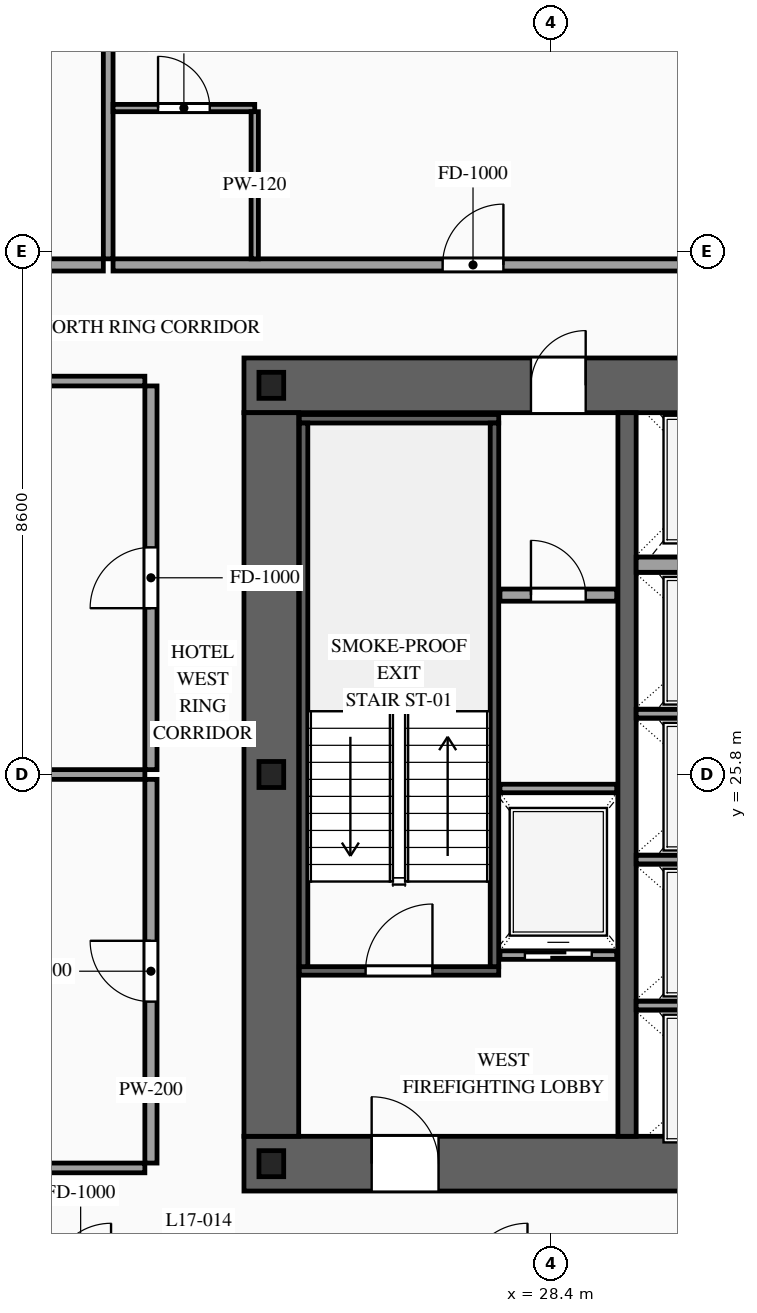
"""IFC4 building model, lengths in metres.
Left out: names, types, materials, properties, quantities, classifications, styles, units other than length and angle.
Written with IfcOpenShell. Run it as: python <this file> out.ifc"""

import sys

from ifc_helpers import new_model, si_unit, direction, frame, frame_2d, origin, origin_2d, place, context, subcontext, project, spatial, rectangle, i_section, extrude, source, transform, mapped, element, fill, save


model = new_model("IFC4")
c1 = context("Model", 3, precision=1e-05, world=origin(), true_north=direction((0.0, 1.0)))
c2 = subcontext(c1, "Body", "Model", "MODEL_VIEW")
j1 = project(units=[si_unit("LENGTHUNIT", "METRE"), si_unit("PLANEANGLEUNIT", "RADIAN")], contexts=[c1])
p1 = place(None, origin())
s1 = spatial("IfcSite", under=j1, at=p1, CompositionType="ELEMENT")
p2 = place(p1, origin())
s2 = spatial("IfcBuilding", under=s1, at=p2, CompositionType="ELEMENT")
p3 = place(p2, frame((0.0, 0.0, 67.6)))
s3 = spatial("IfcBuildingStorey", under=s2, at=p3, CompositionType="ELEMENT", Elevation=67.6)
p4 = place(p3, frame((23.35, 19.4, 0.0), z_axis=(0.0, 0.0, 1.0), x_axis=(1.0, 0.0, 0.0)))
e1 = element("IfcWall", 1, at=p4, inside=s3, PredefinedType="SHEAR", context=c2, shape_type="SweptSolid", body=[
    extrude(rectangle(XDim=27.3, YDim=0.9, at=frame_2d((13.65, 0.0))), origin(), (0.0, 0.0, 1.0), 3.6),
])
p5 = place(p4, frame((2.1, 0.0, 0.0)))
e2 = element("IfcOpeningElement", 2, at=p5, cuts=e1, PredefinedType="OPENING", context=c2, shape_type="SweptSolid", body=[
    extrude(rectangle(XDim=1.1, YDim=2.2, at=frame_2d((0.55, 1.1))), frame((0.0, 0.465, 0.0), z_axis=(0.0, -1.0, 0.0), x_axis=(1.0, 0.0, 0.0)), (0.0, 0.0, 1.0), 0.93),
])
p6 = place(p4, frame((10.0, 0.0, 0.0)))
e3 = element("IfcOpeningElement", 3, at=p6, cuts=e1, PredefinedType="OPENING", context=c2, shape_type="SweptSolid", body=[
    extrude(rectangle(XDim=1.1, YDim=2.2, at=frame_2d((0.55, 1.1))), frame((0.0, 0.465, 0.0), z_axis=(0.0, -1.0, 0.0), x_axis=(1.0, 0.0, 0.0)), (0.0, 0.0, 1.0), 0.93),
])
p7 = place(p4, frame((23.2, 0.0, 0.0)))
e4 = element("IfcOpeningElement", 4, at=p7, cuts=e1, PredefinedType="OPENING", context=c2, shape_type="SweptSolid", body=[
    extrude(rectangle(XDim=1.1, YDim=2.2, at=frame_2d((0.55, 1.1))), frame((0.0, 0.465, 0.0), z_axis=(0.0, -1.0, 0.0), x_axis=(1.0, 0.0, 0.0)), (0.0, 0.0, 1.0), 0.93),
])
p8 = place(p4, frame((19.82, 0.0, 0.0)))
e5 = element("IfcOpeningElement", 5, at=p8, cuts=e1, PredefinedType="OPENING", context=c2, shape_type="SweptSolid", body=[
    extrude(rectangle(XDim=0.9, YDim=2.15, at=frame_2d((0.45, 1.075))), frame((0.0, 0.465, 0.0), z_axis=(0.0, -1.0, 0.0), x_axis=(1.0, 0.0, 0.0)), (0.0, 0.0, 1.0), 0.93),
])
p9 = place(p4, frame((18.38, 0.0, 0.0)))
e6 = element("IfcOpeningElement", 6, at=p9, cuts=e1, PredefinedType="OPENING", context=c2, shape_type="SweptSolid", body=[
    extrude(rectangle(XDim=0.9, YDim=2.15, at=frame_2d((0.45, 1.075))), frame((0.0, 0.465, 0.0), z_axis=(0.0, -1.0, 0.0), x_axis=(1.0, 0.0, 0.0)), (0.0, 0.0, 1.0), 0.93),
])
p10 = place(p3, frame((23.35, 32.2, 0.0), z_axis=(0.0, 0.0, 1.0), x_axis=(1.0, 0.0, 0.0)))
e7 = element("IfcWall", 7, at=p10, inside=s3, PredefinedType="SHEAR", context=c2, shape_type="SweptSolid", body=[
    extrude(rectangle(XDim=27.3, YDim=0.9, at=frame_2d((13.65, 0.0))), origin(), (0.0, 0.0, 1.0), 3.6),
])
p11 = place(p10, frame((4.72, 0.0, 0.0)))
e8 = element("IfcOpeningElement", 8, at=p11, cuts=e7, PredefinedType="OPENING", context=c2, shape_type="SweptSolid", body=[
    extrude(rectangle(XDim=0.9, YDim=2.15, at=frame_2d((0.45, 1.075))), frame((0.0, 0.465, 0.0), z_axis=(0.0, -1.0, 0.0), x_axis=(1.0, 0.0, 0.0)), (0.0, 0.0, 1.0), 0.93),
])
p12 = place(p10, frame((10.0, 0.0, 0.0)))
e9 = element("IfcOpeningElement", 9, at=p12, cuts=e7, PredefinedType="OPENING", context=c2, shape_type="SweptSolid", body=[
    extrude(rectangle(XDim=1.1, YDim=2.2, at=frame_2d((0.55, 1.1))), frame((0.0, 0.465, 0.0), z_axis=(0.0, -1.0, 0.0), x_axis=(1.0, 0.0, 0.0)), (0.0, 0.0, 1.0), 0.93),
])
p13 = place(p10, frame((15.85, 0.0, 0.0)))
e10 = element("IfcOpeningElement", 10, at=p13, cuts=e7, PredefinedType="OPENING", context=c2, shape_type="SweptSolid", body=[
    extrude(rectangle(XDim=1.1, YDim=2.2, at=frame_2d((0.55, 1.1))), frame((0.0, 0.465, 0.0), z_axis=(0.0, -1.0, 0.0), x_axis=(1.0, 0.0, 0.0)), (0.0, 0.0, 1.0), 0.93),
])
p14 = place(p10, frame((18.38, 0.0, 0.0)))
e11 = element("IfcOpeningElement", 11, at=p14, cuts=e7, PredefinedType="OPENING", context=c2, shape_type="SweptSolid", body=[
    extrude(rectangle(XDim=0.9, YDim=2.15, at=frame_2d((0.45, 1.075))), frame((0.0, 0.465, 0.0), z_axis=(0.0, -1.0, 0.0), x_axis=(1.0, 0.0, 0.0)), (0.0, 0.0, 1.0), 0.93),
])
p15 = place(p10, frame((19.82, 0.0, 0.0)))
e12 = element("IfcOpeningElement", 12, at=p15, cuts=e7, PredefinedType="OPENING", context=c2, shape_type="SweptSolid", body=[
    extrude(rectangle(XDim=0.9, YDim=2.15, at=frame_2d((0.45, 1.075))), frame((0.0, 0.465, 0.0), z_axis=(0.0, -1.0, 0.0), x_axis=(1.0, 0.0, 0.0)), (0.0, 0.0, 1.0), 0.93),
])
m1 = source(origin(), c2, "Body", "SweptSolid", [
    extrude(rectangle(XDim=11.9, YDim=0.9, at=frame_2d((5.95, 0.0))), origin(), (0.0, 0.0, 1.0), 3.6),
])
p16 = place(p3, frame((23.8, 19.85, 0.0), z_axis=(0.0, 0.0, 1.0), x_axis=(0.0, 1.0, 0.0)))
e13 = element("IfcWall", 13, at=p16, inside=s3, PredefinedType="SHEAR", context=c2, shape_type="MappedRepresentation", body=[
    mapped(m1, transform((0.0, 0.0, 0.0), scale=1.0)),
])
m2 = source(origin(), c2, "Body", "SweptSolid", [
    extrude(rectangle(XDim=11.9, YDim=0.3, at=frame_2d((5.95, 0.0))), origin(), (0.0, 0.0, 1.0), 3.6),
])
p17 = place(p3, frame((29.65, 19.85, 0.0), z_axis=(0.0, 0.0, 1.0), x_axis=(0.0, 1.0, 0.0)))
e14 = element("IfcWall", 14, at=p17, inside=s3, PredefinedType="SOLIDWALL", context=c2, shape_type="MappedRepresentation", body=[
    mapped(m2, transform((0.0, 0.0, 0.0), scale=1.0)),
])
m3 = source(origin(), c2, "Body", "SweptSolid", [
    extrude(i_section(OverallWidth=0.407, OverallDepth=0.428, WebThickness=0.02, FlangeThickness=0.035, at=origin_2d()), origin(), (0.0, 0.0, 1.0), 3.6),
])
for number, where, z_axis, x_axis in (
    (15, (23.8, 19.4, 0.0), (0.0, 0.0, 1.0), (1.0, 0.0, 0.0)),
    (16, (23.8, 25.8, 0.0), (0.0, 0.0, 1.0), (1.0, 0.0, 0.0)),
    (17, (23.8, 32.2, 0.0), (0.0, 0.0, 1.0), (1.0, 0.0, 0.0)),
):
    element("IfcColumn", number, at=place(p3, frame(where, z_axis=z_axis, x_axis=x_axis)), inside=s3, PredefinedType="COLUMN", context=c2, shape_type="MappedRepresentation", body=[
        mapped(m3, transform((0.0, 0.0, 0.0), scale=1.0)),
    ])
p18 = place(p3, frame((27.56, 22.83, 0.0), z_axis=(0.0, 0.0, 1.0), x_axis=(1.0, 0.0, 0.0)))
e18 = element("IfcWall", 18, at=p18, inside=s3, PredefinedType="SOLIDWALL", context=c2, shape_type="SweptSolid", body=[
    extrude(rectangle(XDim=1.92, YDim=0.14, at=frame_2d((0.96, 0.0))), origin(), (0.0, 0.0, 1.0), 3.38),
])
p19 = place(p18, frame((0.41, 0.0, 0.0)))
e19 = element("IfcOpeningElement", 19, at=p19, cuts=e18, PredefinedType="OPENING", context=c2, shape_type="SweptSolid", body=[
    extrude(rectangle(XDim=1.1, YDim=2.2, at=frame_2d((0.55, 1.1))), frame((0.0, 0.085, 0.0), z_axis=(0.0, -1.0, 0.0), x_axis=(1.0, 0.0, 0.0)), (0.0, 0.0, 1.0), 0.17),
])
m4 = source(origin(), c2, "Body", "SweptSolid", [
    extrude(rectangle(XDim=1.92, YDim=0.14, at=frame_2d((0.96, 0.0))), origin(), (0.0, 0.0, 1.0), 3.38),
])
p20 = place(p3, frame((27.56, 25.57, 0.0), z_axis=(0.0, 0.0, 1.0), x_axis=(1.0, 0.0, 0.0)))
e20 = element("IfcWall", 20, at=p20, inside=s3, PredefinedType="SOLIDWALL", context=c2, shape_type="MappedRepresentation", body=[
    mapped(m4, transform((0.0, 0.0, 0.0), scale=1.0)),
])
m5 = source(origin(), c2, "Body", "SweptSolid", [
    extrude(rectangle(XDim=2.5, YDim=0.14, at=frame_2d((1.25, 0.0))), origin(), (0.0, 0.0, 1.0), 3.38),
])
for number, where, z_axis, x_axis in (
    (21, (29.8, 22.0, 0.0), (0.0, 0.0, 1.0), (1.0, 0.0, 0.0)),
    (22, (29.8, 24.4, 0.0), (0.0, 0.0, 1.0), (1.0, 0.0, 0.0)),
    (23, (29.8, 26.8, 0.0), (0.0, 0.0, 1.0), (1.0, 0.0, 0.0)),
):
    element("IfcWall", number, at=place(p3, frame(where, z_axis=z_axis, x_axis=x_axis)), inside=s3, PredefinedType="SOLIDWALL", context=c2, shape_type="MappedRepresentation", body=[
        mapped(m5, transform((0.0, 0.0, 0.0), scale=1.0)),
    ])
m6 = source(origin(), c2, "Body", "SweptSolid", [
    extrude(rectangle(XDim=2.5, YDim=0.25, at=frame_2d((1.25, 0.0))), origin(), (0.0, 0.0, 1.0), 3.38),
])
p21 = place(p3, frame((29.8, 29.25, 0.0), z_axis=(0.0, 0.0, 1.0), x_axis=(1.0, 0.0, 0.0)))
e24 = element("IfcWall", 24, at=p21, inside=s3, PredefinedType="SOLIDWALL", context=c2, shape_type="MappedRepresentation", body=[
    mapped(m6, transform((0.0, 0.0, 0.0), scale=1.0)),
])
p22 = place(p3, frame((24.26, 22.57, 0.0), z_axis=(0.0, 0.0, 1.0), x_axis=(1.0, 0.0, 0.0)))
e25 = element("IfcWall", 25, at=p22, inside=s3, PredefinedType="SOLIDWALL", context=c2, shape_type="SweptSolid", body=[
    extrude(rectangle(XDim=3.28, YDim=0.14, at=frame_2d((1.64, 0.0))), origin(), (0.0, 0.0, 1.0), 3.38),
])
p23 = place(p22, frame((1.09, 0.0, 0.0)))
e26 = element("IfcOpeningElement", 26, at=p23, cuts=e25, PredefinedType="OPENING", context=c2, shape_type="SweptSolid", body=[
    extrude(rectangle(XDim=1.1, YDim=2.2, at=frame_2d((0.55, 1.1))), frame((0.0, 0.085, 0.0), z_axis=(0.0, -1.0, 0.0), x_axis=(1.0, 0.0, 0.0)), (0.0, 0.0, 1.0), 0.17),
])
m7 = source(origin(), c2, "Body", "SweptSolid", [
    extrude(rectangle(XDim=3.28, YDim=0.14, at=frame_2d((1.64, 0.0))), origin(), (0.0, 0.0, 1.0), 3.38),
])
p24 = place(p3, frame((24.26, 31.65, 0.0), z_axis=(0.0, 0.0, 1.0), x_axis=(1.0, 0.0, 0.0)))
e27 = element("IfcWall", 27, at=p24, inside=s3, PredefinedType="SOLIDWALL", context=c2, shape_type="MappedRepresentation", body=[
    mapped(m7, transform((0.0, 0.0, 0.0), scale=1.0)),
])
m8 = source(origin(), c2, "Body", "SweptSolid", [
    extrude(rectangle(XDim=8.94, YDim=0.14, at=frame_2d((4.47, 0.0))), origin(), (0.0, 0.0, 1.0), 3.38),
])
for number, where, z_axis, x_axis in (
    (28, (24.33, 22.64, 0.0), (0.0, 0.0, 1.0), (0.0, 1.0, 0.0)),
    (29, (27.47, 22.64, 0.0), (0.0, 0.0, 1.0), (0.0, 1.0, 0.0)),
):
    element("IfcWall", number, at=place(p3, frame(where, z_axis=z_axis, x_axis=x_axis)), inside=s3, PredefinedType="SOLIDWALL", context=c2, shape_type="MappedRepresentation", body=[
        mapped(m8, transform((0.0, 0.0, 0.0), scale=1.0)),
    ])
p25 = place(p3, frame((27.56, 28.75, 0.0), z_axis=(0.0, 0.0, 1.0), x_axis=(1.0, 0.0, 0.0)))
e30 = element("IfcWall", 30, at=p25, inside=s3, PredefinedType="PARTITIONING", context=c2, shape_type="SweptSolid", body=[
    extrude(rectangle(XDim=1.92, YDim=0.2, at=frame_2d((0.96, 0.0))), origin(), (0.0, 0.0, 1.0), 3.38),
])
p26 = place(p25, frame((0.51, 0.0, 0.0)))
e31 = element("IfcOpeningElement", 31, at=p26, cuts=e30, PredefinedType="OPENING", context=c2, shape_type="SweptSolid", body=[
    extrude(rectangle(XDim=0.9, YDim=2.15, at=frame_2d((0.45, 1.075))), frame((0.0, 0.115, 0.0), z_axis=(0.0, -1.0, 0.0), x_axis=(1.0, 0.0, 0.0)), (0.0, 0.0, 1.0), 0.23),
])
p27 = place(p3, frame((14.94, 34.18, 0.0), z_axis=(0.0, 0.0, 1.0), x_axis=(1.0, 0.0, 0.0)))
e32 = element("IfcWall", 32, at=p27, inside=s3, PredefinedType="PARTITIONING", context=c2, shape_type="SweptSolid", body=[
    extrude(rectangle(XDim=6.097, YDim=0.2, at=frame_2d((3.049, 0.0))), origin(), (0.0, 0.0, 1.0), 3.38),
])
p28 = place(p27, frame((3.754, 0.0, 0.0)))
e33 = element("IfcOpeningElement", 33, at=p28, cuts=e32, PredefinedType="OPENING", context=c2, shape_type="SweptSolid", body=[
    extrude(rectangle(XDim=1.0, YDim=2.2, at=frame_2d((0.5, 1.1))), frame((0.0, 0.115, 0.0), z_axis=(0.0, -1.0, 0.0), x_axis=(1.0, 0.0, 0.0)), (0.0, 0.0, 1.0), 0.23),
])
m9 = source(origin(), c2, "Body", "SweptSolid", [
    extrude(rectangle(XDim=16.47, YDim=0.16, at=frame_2d((8.235, 0.0))), origin(), (0.0, 0.0, 1.0), 3.38),
])
p29 = place(p3, frame((21.117, 34.28, 0.0), z_axis=(0.0, 0.0, 1.0), x_axis=(0.0, 1.0, 0.0)))
e34 = element("IfcWall", 34, at=p29, inside=s3, PredefinedType="PARTITIONING", context=c2, shape_type="MappedRepresentation", body=[
    mapped(m9, transform((0.0, 0.0, 0.0), scale=1.0)),
])
p30 = place(p3, frame((21.197, 34.18, 0.0), z_axis=(0.0, 0.0, 1.0), x_axis=(1.0, 0.0, 0.0)))
e35 = element("IfcWall", 35, at=p30, inside=s3, PredefinedType="PARTITIONING", context=c2, shape_type="SweptSolid", body=[
    extrude(rectangle(XDim=9.429, YDim=0.2, at=frame_2d((4.714, 0.0))), origin(), (0.0, 0.0, 1.0), 3.38),
])
p31 = place(p30, frame((5.42, 0.0, 0.0)))
e36 = element("IfcOpeningElement", 36, at=p31, cuts=e35, PredefinedType="OPENING", context=c2, shape_type="SweptSolid", body=[
    extrude(rectangle(XDim=1.0, YDim=2.2, at=frame_2d((0.5, 1.1))), frame((0.0, 0.115, 0.0), z_axis=(0.0, -1.0, 0.0), x_axis=(1.0, 0.0, 0.0)), (0.0, 0.0, 1.0), 0.23),
])
p32 = place(p3, frame((21.197, 36.76, 0.0), z_axis=(0.0, 0.0, 1.0), x_axis=(1.0, 0.0, 0.0)))
e37 = element("IfcWall", 37, at=p32, inside=s3, PredefinedType="PARTITIONING", context=c2, shape_type="SweptSolid", body=[
    extrude(rectangle(XDim=2.33, YDim=0.12, at=frame_2d((1.165, 0.0))), origin(), (0.0, 0.0, 1.0), 3.38),
])
p33 = place(p32, frame((0.74, 0.0, 0.0)))
e38 = element("IfcOpeningElement", 38, at=p33, cuts=e37, PredefinedType="OPENING", context=c2, shape_type="SweptSolid", body=[
    extrude(rectangle(XDim=0.85, YDim=2.1, at=frame_2d((0.425, 1.05))), frame((0.0, 0.075, 0.0), z_axis=(0.0, -1.0, 0.0), x_axis=(1.0, 0.0, 0.0)), (0.0, 0.0, 1.0), 0.15),
])
m10 = source(origin(), c2, "Body", "SweptSolid", [
    extrude(rectangle(XDim=2.42, YDim=0.12, at=frame_2d((1.21, 0.0))), origin(), (0.0, 0.0, 1.0), 3.38),
])
p34 = place(p3, frame((23.527, 34.28, 0.0), z_axis=(0.0, 0.0, 1.0), x_axis=(0.0, 1.0, 0.0)))
e39 = element("IfcWall", 39, at=p34, inside=s3, PredefinedType="PARTITIONING", context=c2, shape_type="MappedRepresentation", body=[
    mapped(m10, transform((0.0, 0.0, 0.0), scale=1.0)),
])
p35 = place(p3, frame((21.82, 19.41, 0.0), z_axis=(0.0, 0.0, 1.0), x_axis=(0.0, 1.0, 0.0)))
e40 = element("IfcWall", 40, at=p35, inside=s3, PredefinedType="PARTITIONING", context=c2, shape_type="SweptSolid", body=[
    extrude(rectangle(XDim=6.31, YDim=0.2, at=frame_2d((3.155, 0.0))), origin(), (0.0, 0.0, 1.0), 3.38),
])
p36 = place(p35, frame((2.655, 0.0, 0.0)))
e41 = element("IfcOpeningElement", 41, at=p36, cuts=e40, PredefinedType="OPENING", context=c2, shape_type="SweptSolid", body=[
    extrude(rectangle(XDim=1.0, YDim=2.2, at=frame_2d((0.5, 1.1))), frame((0.0, 0.115, 0.0), z_axis=(0.0, -1.0, 0.0), x_axis=(1.0, 0.0, 0.0)), (0.0, 0.0, 1.0), 0.23),
])
m11 = source(origin(), c2, "Body", "SweptSolid", [
    extrude(rectangle(XDim=9.67, YDim=0.16, at=frame_2d((4.835, 0.0))), origin(), (0.0, 0.0, 1.0), 2.575),
])
p37 = place(p3, frame((12.05, 25.8, 0.0), z_axis=(0.0, 0.0, 1.0), x_axis=(1.0, 0.0, 0.0)))
e42 = element("IfcWall", 42, at=p37, inside=s3, PredefinedType="PARTITIONING", context=c2, shape_type="MappedRepresentation", body=[
    mapped(m11, transform((0.0, 0.0, 0.0), scale=1.0)),
])
m12 = source(origin(), c2, "Body", "SweptSolid", [
    extrude(rectangle(XDim=9.67, YDim=0.16, at=frame_2d((4.835, 0.0))), origin(), (0.0, 0.0, 1.0), 2.875),
])
p38 = place(p3, frame((12.05, 19.33, 0.0), z_axis=(0.0, 0.0, 1.0), x_axis=(1.0, 0.0, 0.0)))
e43 = element("IfcWall", 43, at=p38, inside=s3, PredefinedType="PARTITIONING", context=c2, shape_type="MappedRepresentation", body=[
    mapped(m12, transform((0.0, 0.0, 0.0), scale=1.0)),
])
p39 = place(p3, frame((21.82, 25.88, 0.0), z_axis=(0.0, 0.0, 1.0), x_axis=(0.0, 1.0, 0.0)))
e44 = element("IfcWall", 44, at=p39, inside=s3, PredefinedType="PARTITIONING", context=c2, shape_type="SweptSolid", body=[
    extrude(rectangle(XDim=6.31, YDim=0.2, at=frame_2d((3.155, 0.0))), origin(), (0.0, 0.0, 1.0), 3.38),
])
p40 = place(p39, frame((2.655, 0.0, 0.0)))
e45 = element("IfcOpeningElement", 45, at=p40, cuts=e44, PredefinedType="OPENING", context=c2, shape_type="SweptSolid", body=[
    extrude(rectangle(XDim=1.0, YDim=2.2, at=frame_2d((0.5, 1.1))), frame((0.0, 0.115, 0.0), z_axis=(0.0, -1.0, 0.0), x_axis=(1.0, 0.0, 0.0)), (0.0, 0.0, 1.0), 0.23),
])
p41 = place(p3, frame((12.05, 32.27, 0.0), z_axis=(0.0, 0.0, 1.0), x_axis=(1.0, 0.0, 0.0)))
e46 = element("IfcWall", 46, at=p41, inside=s3, PredefinedType="PARTITIONING", context=c2, shape_type="MappedRepresentation", body=[
    mapped(m12, transform((0.0, 0.0, 0.0), scale=1.0)),
])
m13 = source(origin(), c2, "Body", "SweptSolid", [
    extrude(rectangle(XDim=1.1, YDim=2.2, at=frame_2d((0.55, 1.1))), frame((0.0, 0.025, 0.0), z_axis=(0.0, -1.0, 0.0), x_axis=(1.0, 0.0, 0.0)), (0.0, 0.0, 1.0), 0.05),
])
p42 = place(p19, origin())
e47 = element("IfcDoor", 47, at=p42, inside=s3, OperationType="SLIDING_TO_LEFT", PredefinedType="DOOR", context=c2, shape_type="MappedRepresentation", body=[
    mapped(m13, transform((0.0, 0.0, 0.0), scale=1.0)),
])
fill(e19, e47)
m14 = source(origin(), c2, "Body", "SweptSolid", [
    extrude(rectangle(XDim=1.1, YDim=2.2, at=frame_2d((0.55, 1.1))), frame((0.0, 0.025, 0.0), z_axis=(0.0, -1.0, 0.0), x_axis=(1.0, 0.0, 0.0)), (0.0, 0.0, 1.0), 0.05),
])
p43 = place(p23, origin())
e48 = element("IfcDoor", 48, at=p43, inside=s3, OperationType="SINGLE_SWING_RIGHT", PredefinedType="DOOR", context=c2, shape_type="MappedRepresentation", body=[
    mapped(m14, transform((0.0, 0.0, 0.0), scale=1.0)),
])
fill(e26, e48)
p44 = place(p5, origin())
e49 = element("IfcDoor", 49, at=p44, inside=s3, OperationType="SINGLE_SWING_LEFT", PredefinedType="DOOR", context=c2, shape_type="MappedRepresentation", body=[
    mapped(m14, transform((0.0, 0.0, 0.0), scale=1.0)),
])
fill(e2, e49)
m15 = source(origin(), c2, "Body", "SweptSolid", [
    extrude(rectangle(XDim=0.9, YDim=2.15, at=frame_2d((0.45, 1.075))), frame((0.0, 0.025, 0.0), z_axis=(0.0, -1.0, 0.0), x_axis=(1.0, 0.0, 0.0)), (0.0, 0.0, 1.0), 0.05),
])
p45 = place(p11, origin())
e50 = element("IfcDoor", 50, at=p45, inside=s3, OperationType="SINGLE_SWING_RIGHT", PredefinedType="DOOR", context=c2, shape_type="MappedRepresentation", body=[
    mapped(m15, transform((0.0, 0.0, 0.0), scale=1.0)),
])
fill(e8, e50)
p46 = place(p26, origin())
e51 = element("IfcDoor", 51, at=p46, inside=s3, OperationType="SINGLE_SWING_LEFT", PredefinedType="DOOR", context=c2, shape_type="MappedRepresentation", body=[
    mapped(m15, transform((0.0, 0.0, 0.0), scale=1.0)),
])
fill(e31, e51)
m16 = source(origin(), c2, "Body", "SweptSolid", [
    extrude(rectangle(XDim=1.0, YDim=2.2, at=frame_2d((0.5, 1.1))), frame((0.0, 0.025, 0.0), z_axis=(0.0, -1.0, 0.0), x_axis=(1.0, 0.0, 0.0)), (0.0, 0.0, 1.0), 0.05),
])
p47 = place(p31, origin())
e52 = element("IfcDoor", 52, at=p47, inside=s3, OperationType="SINGLE_SWING_RIGHT", PredefinedType="DOOR", context=c2, shape_type="MappedRepresentation", body=[
    mapped(m16, transform((0.0, 0.0, 0.0), scale=1.0)),
])
fill(e36, e52)
m17 = source(origin(), c2, "Body", "SweptSolid", [
    extrude(rectangle(XDim=0.85, YDim=2.1, at=frame_2d((0.425, 1.05))), frame((0.0, 0.025, 0.0), z_axis=(0.0, -1.0, 0.0), x_axis=(1.0, 0.0, 0.0)), (0.0, 0.0, 1.0), 0.05),
])
p48 = place(p33, origin())
e53 = element("IfcDoor", 53, at=p48, inside=s3, OperationType="SINGLE_SWING_LEFT", PredefinedType="DOOR", context=c2, shape_type="MappedRepresentation", body=[
    mapped(m17, transform((0.0, 0.0, 0.0), scale=1.0)),
])
fill(e38, e53)
p49 = place(p36, origin())
e54 = element("IfcDoor", 54, at=p49, inside=s3, OperationType="SINGLE_SWING_RIGHT", PredefinedType="DOOR", context=c2, shape_type="MappedRepresentation", body=[
    mapped(m16, transform((0.0, 0.0, 0.0), scale=1.0)),
])
fill(e41, e54)
p50 = place(p40, origin())
e55 = element("IfcDoor", 55, at=p50, inside=s3, OperationType="SINGLE_SWING_LEFT", PredefinedType="DOOR", context=c2, shape_type="MappedRepresentation", body=[
    mapped(m16, transform((0.0, 0.0, 0.0), scale=1.0)),
])
fill(e45, e55)
save(model, sys.argv[1])
